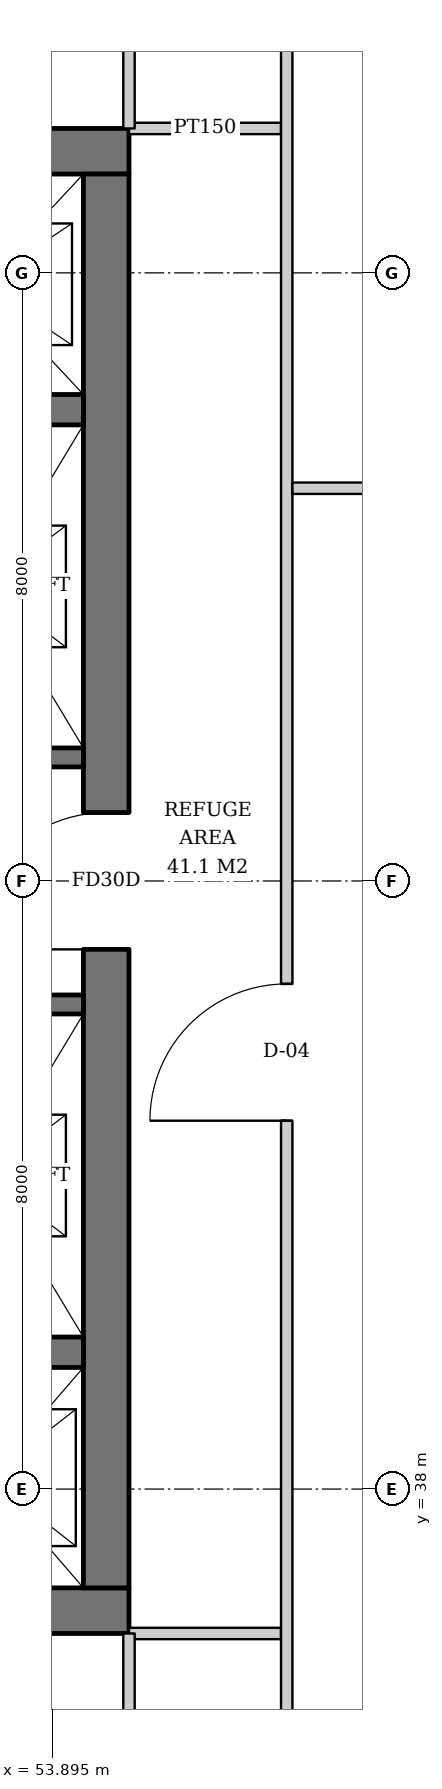
"""IFC4 building model, lengths in metres.
Left out: names, types, materials, properties, quantities, classifications, styles, units other than length and angle.
Written with IfcOpenShell. Run it as: python <this file> out.ifc"""

import sys

from ifc_helpers import new_model, si_unit, direction, frame, frame_2d, origin, place, context, subcontext, project, spatial, rectangle, extrude, element, fill, save


model = new_model("IFC4")
c1 = context("Model", 3, precision=1e-05, world=origin(), true_north=direction((0.0, 1.0)))
c2 = subcontext(c1, "Body", "Model", "MODEL_VIEW")
j1 = project(units=[si_unit("LENGTHUNIT", "METRE"), si_unit("PLANEANGLEUNIT", "RADIAN")], contexts=[c1])
p1 = place(None, origin())
s1 = spatial("IfcSite", under=j1, at=p1, CompositionType="ELEMENT")
p2 = place(p1, origin())
s2 = spatial("IfcBuilding", under=s1, at=p2, CompositionType="ELEMENT")
p3 = place(p2, frame((0.0, 0.0, 230.0)))
s3 = spatial("IfcBuildingStorey", under=s2, at=p3, CompositionType="ELEMENT", Elevation=230.0)
p4 = place(p3, frame((35.1, 36.4, 0.0), z_axis=(0.0, 0.0, 1.0), x_axis=(1.0, 0.0, 0.0)))
e1 = element("IfcWall", 1, at=p4, inside=s3, PredefinedType="SHEAR", context=c2, shape_type="SweptSolid", body=[
    extrude(rectangle(XDim=19.8, YDim=0.6, at=frame_2d((9.9, 0.0))), origin(), (0.0, 0.0, 1.0), 3.8),
])
p5 = place(p4, frame((3.9, 0.0, 0.0)))
e2 = element("IfcOpeningElement", 2, at=p5, cuts=e1, PredefinedType="OPENING", context=c2, shape_type="SweptSolid", body=[
    extrude(rectangle(XDim=1.0, YDim=2.1, at=frame_2d((0.5, 1.05))), frame((0.0, 0.31, 0.0), z_axis=(0.0, -1.0, 0.0), x_axis=(1.0, 0.0, 0.0)), (0.0, 0.0, 1.0), 0.62),
])
p6 = place(p4, frame((15.35, 0.0, 0.0)))
e3 = element("IfcOpeningElement", 3, at=p6, cuts=e1, PredefinedType="OPENING", context=c2, shape_type="SweptSolid", body=[
    extrude(rectangle(XDim=1.0, YDim=2.1, at=frame_2d((0.5, 1.05))), frame((0.0, 0.31, 0.0), z_axis=(0.0, -1.0, 0.0), x_axis=(1.0, 0.0, 0.0)), (0.0, 0.0, 1.0), 0.62),
])
p7 = place(p3, frame((35.1, 55.6, 0.0), z_axis=(0.0, 0.0, 1.0), x_axis=(1.0, 0.0, 0.0)))
e4 = element("IfcWall", 4, at=p7, inside=s3, PredefinedType="SHEAR", context=c2, shape_type="SweptSolid", body=[
    extrude(rectangle(XDim=19.8, YDim=0.6, at=frame_2d((9.9, 0.0))), origin(), (0.0, 0.0, 1.0), 3.8),
])
p8 = place(p7, frame((14.54, 0.0, 0.0)))
e5 = element("IfcOpeningElement", 5, at=p8, cuts=e4, PredefinedType="OPENING", context=c2, shape_type="SweptSolid", body=[
    extrude(rectangle(XDim=1.0, YDim=2.1, at=frame_2d((0.5, 1.05))), frame((0.0, 0.31, 0.0), z_axis=(0.0, -1.0, 0.0), x_axis=(1.0, 0.0, 0.0)), (0.0, 0.0, 1.0), 0.62),
])
p9 = place(p7, frame((1.675, 0.0, 0.0)))
e6 = element("IfcOpeningElement", 6, at=p9, cuts=e4, PredefinedType="OPENING", context=c2, shape_type="SweptSolid", body=[
    extrude(rectangle(XDim=1.0, YDim=2.1, at=frame_2d((0.5, 1.05))), frame((0.0, 0.31, 0.0), z_axis=(0.0, -1.0, 0.0), x_axis=(1.0, 0.0, 0.0)), (0.0, 0.0, 1.0), 0.62),
])
p10 = place(p7, frame((3.587, 0.0, 0.0)))
e7 = element("IfcOpeningElement", 7, at=p10, cuts=e4, PredefinedType="OPENING", context=c2, shape_type="SweptSolid", body=[
    extrude(rectangle(XDim=1.0, YDim=2.1, at=frame_2d((0.5, 1.05))), frame((0.0, 0.31, 0.0), z_axis=(0.0, -1.0, 0.0), x_axis=(1.0, 0.0, 0.0)), (0.0, 0.0, 1.0), 0.62),
])
p11 = place(p3, frame((54.6, 36.7, 0.0), z_axis=(0.0, 0.0, 1.0), x_axis=(0.0, 1.0, 0.0)))
e8 = element("IfcWall", 8, at=p11, inside=s3, PredefinedType="SHEAR", context=c2, shape_type="SweptSolid", body=[
    extrude(rectangle(XDim=18.6, YDim=0.6, at=frame_2d((9.3, 0.0))), origin(), (0.0, 0.0, 1.0), 3.8),
])
p12 = place(p11, frame((8.4, 0.0, 0.0)))
e9 = element("IfcOpeningElement", 9, at=p12, cuts=e8, PredefinedType="OPENING", context=c2, shape_type="SweptSolid", body=[
    extrude(rectangle(XDim=1.8, YDim=2.4, at=frame_2d((0.9, 1.2))), frame((0.0, 0.31, 0.0), z_axis=(0.0, -1.0, 0.0), x_axis=(1.0, 0.0, 0.0)), (0.0, 0.0, 1.0), 0.62),
])
p13 = place(p3, frame((35.7, 39.8, 0.0), z_axis=(0.0, 0.0, 1.0), x_axis=(1.0, 0.0, 0.0)))
e10 = element("IfcWall", 10, at=p13, inside=s3, PredefinedType="SHEAR", context=c2, shape_type="SweptSolid", body=[
    extrude(rectangle(XDim=18.6, YDim=0.4, at=frame_2d((9.3, 0.0))), origin(), (0.0, 0.0, 1.0), 3.8),
])
p14 = place(p13, frame((3.3, 0.0, 0.0)))
e11 = element("IfcOpeningElement", 11, at=p14, cuts=e10, PredefinedType="OPENING", context=c2, shape_type="SweptSolid", body=[
    extrude(rectangle(XDim=1.0, YDim=2.1, at=frame_2d((0.5, 1.05))), frame((0.0, 0.21, 0.0), z_axis=(0.0, -1.0, 0.0), x_axis=(1.0, 0.0, 0.0)), (0.0, 0.0, 1.0), 0.42),
])
p15 = place(p3, frame((35.7, 52.2, 0.0), z_axis=(0.0, 0.0, 1.0), x_axis=(1.0, 0.0, 0.0)))
e12 = element("IfcWall", 12, at=p15, inside=s3, PredefinedType="SHEAR", context=c2, shape_type="SweptSolid", body=[
    extrude(rectangle(XDim=18.6, YDim=0.4, at=frame_2d((9.3, 0.0))), origin(), (0.0, 0.0, 1.0), 3.8),
])
p16 = place(p15, frame((11.33, 0.0, 0.0)))
e13 = element("IfcOpeningElement", 13, at=p16, cuts=e12, PredefinedType="OPENING", context=c2, shape_type="SweptSolid", body=[
    extrude(rectangle(XDim=1.0, YDim=2.1, at=frame_2d((0.5, 1.05))), frame((0.0, 0.21, 0.0), z_axis=(0.0, -1.0, 0.0), x_axis=(1.0, 0.0, 0.0)), (0.0, 0.0, 1.0), 0.42),
])
for number, where, z_axis, x_axis in (
    (14, (48.93, 47.625, 0.0), (0.0, 0.0, 1.0), (1.0, 0.0, 0.0)),
    (15, (48.93, 44.375, 0.0), (0.0, 0.0, 1.0), (1.0, 0.0, 0.0)),
):
    element("IfcWall", number, at=place(p3, frame(where, z_axis=z_axis, x_axis=x_axis)), inside=s3, PredefinedType="SHEAR", context=c2, shape_type="SweptSolid", body=[
        extrude(rectangle(XDim=5.37, YDim=0.25, at=frame_2d((2.685, 0.0))), origin(), (0.0, 0.0, 1.0), 3.8),
    ])
for number, where, z_axis, x_axis in (
    (16, (54.9, 55.9, 0.0), (0.0, 0.0, 1.0), (1.0, 0.0, 0.0)),
    (17, (54.9, 36.1, 0.0), (0.0, 0.0, 1.0), (1.0, 0.0, 0.0)),
):
    element("IfcWall", number, at=place(p3, frame(where, z_axis=z_axis, x_axis=x_axis)), inside=s3, PredefinedType="PARTITIONING", context=c2, shape_type="SweptSolid", body=[
        extrude(rectangle(XDim=2.0, YDim=0.15, at=frame_2d((1.0, 0.0))), origin(), (0.0, 0.0, 1.0), 3.6),
    ])
p17 = place(p3, frame((56.975, 33.264, 0.0), z_axis=(0.0, 0.0, 1.0), x_axis=(0.0, 1.0, 0.0)))
e18 = element("IfcWall", 18, at=p17, inside=s3, PredefinedType="PARTITIONING", context=c2, shape_type="SweptSolid", body=[
    extrude(rectangle(XDim=24.636, YDim=0.15, at=frame_2d((12.318, 0.0))), origin(), (0.0, 0.0, 1.0), 3.0),
])
p18 = place(p17, frame((9.582, 0.0, 0.0)))
e19 = element("IfcOpeningElement", 19, at=p18, cuts=e18, PredefinedType="OPENING", context=c2, shape_type="SweptSolid", body=[
    extrude(rectangle(XDim=1.8, YDim=2.4, at=frame_2d((0.9, 1.2))), frame((0.0, 0.085, 0.0), z_axis=(0.0, -1.0, 0.0), x_axis=(1.0, 0.0, 0.0)), (0.0, 0.0, 1.0), 0.17),
])
p19 = place(p3, frame((57.05, 51.167, 0.0), z_axis=(0.0, 0.0, 1.0), x_axis=(1.0, 0.0, 0.0)))
e20 = element("IfcWall", 20, at=p19, inside=s3, PredefinedType="PARTITIONING", context=c2, shape_type="SweptSolid", body=[
    extrude(rectangle(XDim=4.584, YDim=0.15, at=frame_2d((2.292, 0.0))), origin(), (0.0, 0.0, 1.0), 3.6),
])
for number, where, z_axis, x_axis in (
    (21, (54.9, 55.9, 0.0), (0.0, 0.0, 1.0), (0.0, 1.0, 0.0)),
    (22, (54.9, 36.1, 0.0), (0.0, 0.0, 1.0), (0.0, -1.0, 0.0)),
):
    element("IfcWall", number, at=place(p3, frame(where, z_axis=z_axis, x_axis=x_axis)), inside=s3, PredefinedType="PARTITIONING", context=c2, shape_type="SweptSolid", body=[
        extrude(rectangle(XDim=2.0, YDim=0.15, at=frame_2d((1.0, 0.0))), origin(), (0.0, 0.0, 1.0), 3.6),
    ])
p20 = place(p12, origin())
e23 = element("IfcDoor", 23, at=p20, inside=s3, OperationType="DOUBLE_DOOR_SINGLE_SWING", PredefinedType="DOOR", context=c2, shape_type="SweptSolid", body=[
    extrude(rectangle(XDim=1.8, YDim=2.4, at=frame_2d((0.9, 1.2))), frame((0.0, 0.025, 0.0), z_axis=(0.0, -1.0, 0.0), x_axis=(1.0, 0.0, 0.0)), (0.0, 0.0, 1.0), 0.05),
])
fill(e9, e23)
p21 = place(p18, origin())
e24 = element("IfcDoor", 24, at=p21, inside=s3, OperationType="DOUBLE_DOOR_SINGLE_SWING", PredefinedType="DOOR", context=c2, shape_type="SweptSolid", body=[
    extrude(rectangle(XDim=1.8, YDim=2.4, at=frame_2d((0.9, 1.2))), frame((0.0, 0.025, 0.0), z_axis=(0.0, -1.0, 0.0), x_axis=(1.0, 0.0, 0.0)), (0.0, 0.0, 1.0), 0.05),
])
fill(e19, e24)
save(model, sys.argv[1])
